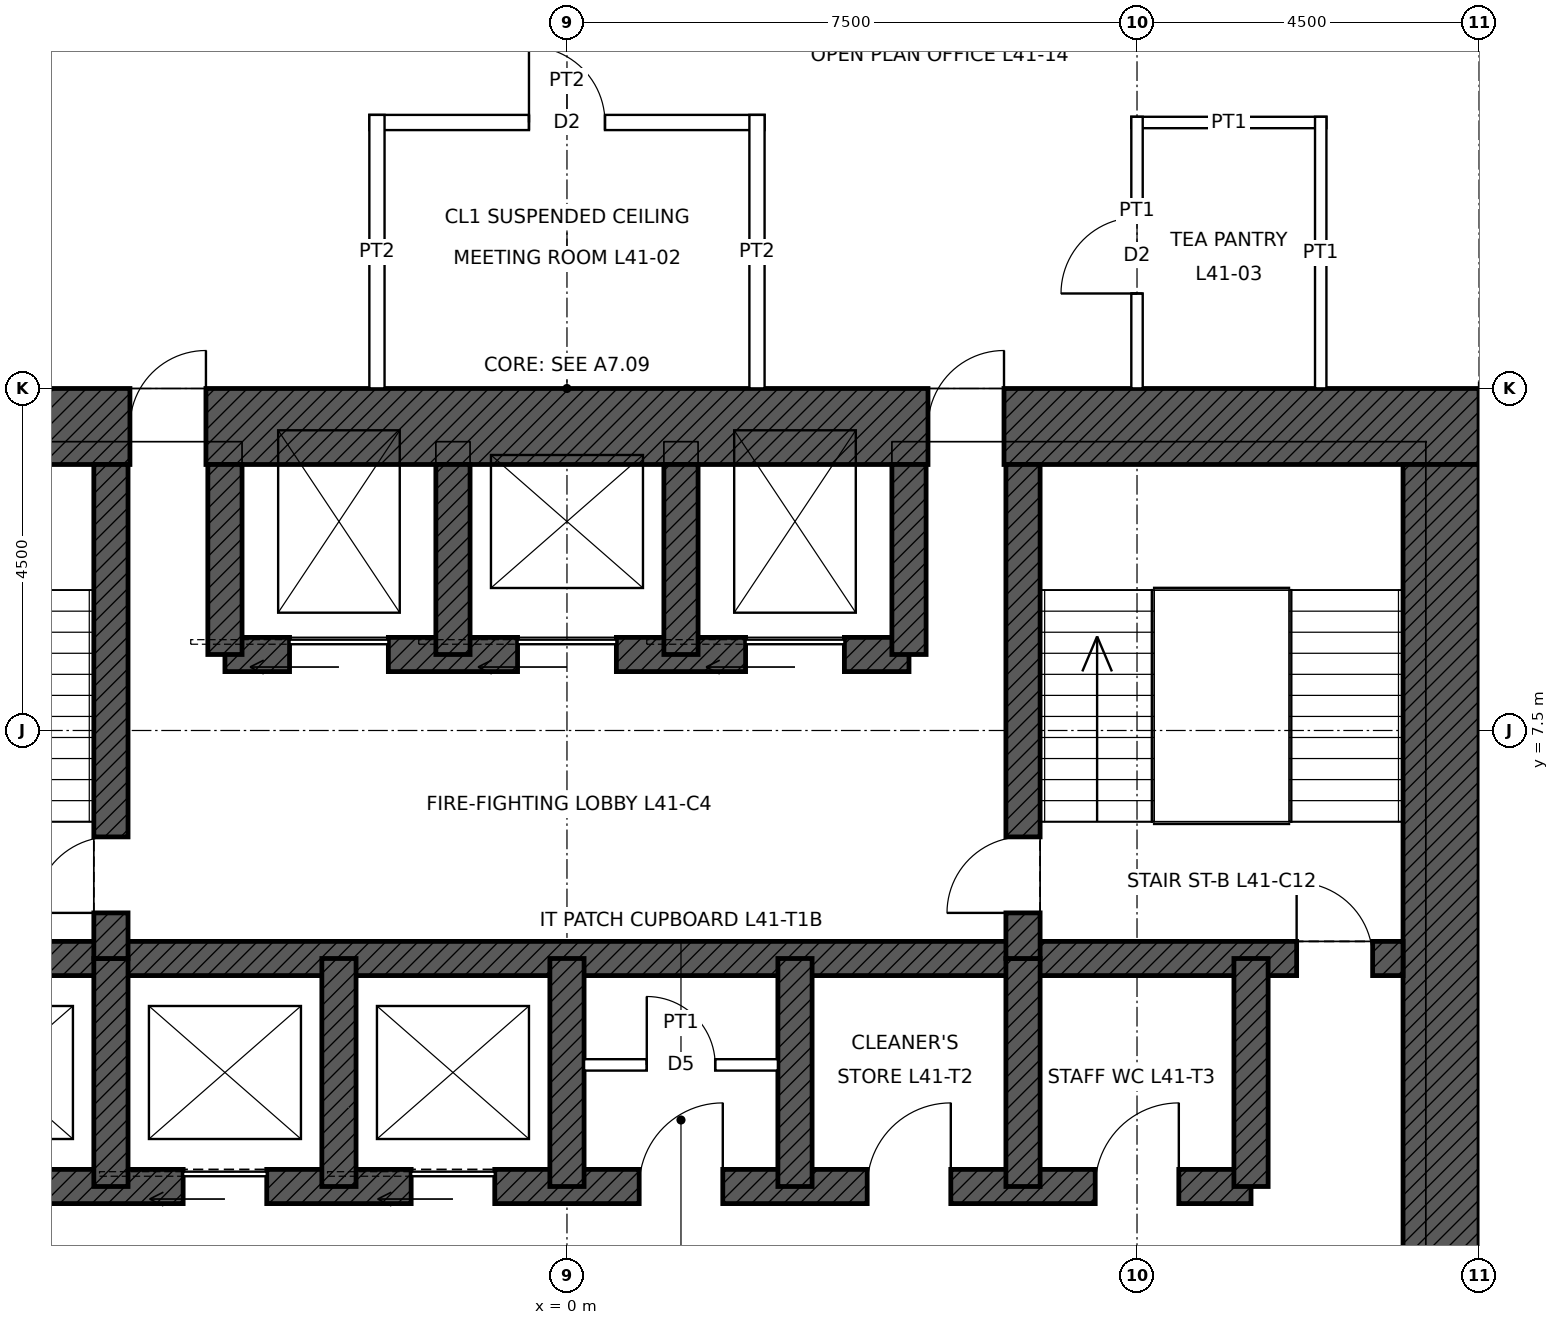
"""IFC4 building model, lengths in metres.
Left out: names, types, materials, properties, quantities, classifications, styles, units other than length and angle.
Written with IfcOpenShell. Run it as: python <this file> out.ifc"""

import sys

from ifc_helpers import new_model, si_unit, direction, frame, frame_2d, origin, place, context, subcontext, project, spatial, rectangle, extrude, element, fill, save


model = new_model("IFC4")
c1 = context("Model", 3, precision=1e-05, world=origin(), true_north=direction((0.0, 1.0)))
c2 = subcontext(c1, "Body", "Model", "MODEL_VIEW")
j1 = project(units=[si_unit("LENGTHUNIT", "METRE"), si_unit("PLANEANGLEUNIT", "RADIAN")], contexts=[c1])
p1 = place(None, origin())
s1 = spatial("IfcSite", under=j1, at=p1, CompositionType="ELEMENT")
p2 = place(p1, origin())
s2 = spatial("IfcBuilding", under=s1, at=p2, CompositionType="ELEMENT")
p3 = place(p2, frame((0.0, 0.0, 197.9)))
s3 = spatial("IfcBuildingStorey", under=s2, at=p3, CompositionType="ELEMENT", Elevation=197.9)
p4 = place(p3, frame((-12.0, 11.5, 0.0), z_axis=(0.0, 0.0, 1.0), x_axis=(1.0, 0.0, 0.0)))
e1 = element("IfcWall", 1, at=p4, inside=s3, PredefinedType="SHEAR", context=c2, shape_type="SweptSolid", body=[
    extrude(rectangle(XDim=24.0, YDim=1.0, at=frame_2d((12.0, 0.0))), origin(), (0.0, 0.0, 1.0), 4.0),
])
p5 = place(p4, frame((6.25, 0.0, 0.0)))
e2 = element("IfcOpeningElement", 2, at=p5, cuts=e1, PredefinedType="OPENING", context=c2, shape_type="SweptSolid", body=[
    extrude(rectangle(XDim=1.0, YDim=2.4, at=frame_2d((0.5, 1.2))), frame((0.0, 0.51, 0.0), z_axis=(0.0, -1.0, 0.0), x_axis=(1.0, 0.0, 0.0)), (0.0, 0.0, 1.0), 1.02),
])
p6 = place(p4, frame((16.75, 0.0, 0.0)))
e3 = element("IfcOpeningElement", 3, at=p6, cuts=e1, PredefinedType="OPENING", context=c2, shape_type="SweptSolid", body=[
    extrude(rectangle(XDim=1.0, YDim=2.4, at=frame_2d((0.5, 1.2))), frame((0.0, 0.51, 0.0), z_axis=(0.0, -1.0, 0.0), x_axis=(1.0, 0.0, 0.0)), (0.0, 0.0, 1.0), 1.02),
])
p7 = place(p3, frame((11.5, 11.0, 0.0), z_axis=(0.0, 0.0, 1.0), x_axis=(0.0, -1.0, 0.0)))
e4 = element("IfcWall", 4, at=p7, inside=s3, PredefinedType="SHEAR", context=c2, shape_type="SweptSolid", body=[
    extrude(rectangle(XDim=22.0, YDim=1.0, at=frame_2d((11.0, 0.0))), origin(), (0.0, 0.0, 1.0), 4.0),
])
p8 = place(p7, frame((10.5, 0.0, 0.0)))
e5 = element("IfcOpeningElement", 5, at=p8, cuts=e4, PredefinedType="OPENING", context=c2, shape_type="SweptSolid", body=[
    extrude(rectangle(XDim=1.0, YDim=2.4, at=frame_2d((0.5, 1.2))), frame((0.0, 0.51, 0.0), z_axis=(0.0, -1.0, 0.0), x_axis=(1.0, 0.0, 0.0)), (0.0, 0.0, 1.0), 1.02),
])
p9 = place(p3, frame((-11.0, 4.5, 0.0), z_axis=(0.0, 0.0, 1.0), x_axis=(1.0, 0.0, 0.0)))
e6 = element("IfcWall", 6, at=p9, inside=s3, PredefinedType="SHEAR", context=c2, shape_type="SweptSolid", body=[
    extrude(rectangle(XDim=22.0, YDim=0.45, at=frame_2d((11.0, 0.0))), origin(), (0.0, 0.0, 1.0), 4.0),
])
p10 = place(p9, frame((0.4, 0.0, 0.0)))
e7 = element("IfcOpeningElement", 7, at=p10, cuts=e6, PredefinedType="OPENING", context=c2, shape_type="SweptSolid", body=[
    extrude(rectangle(XDim=1.0, YDim=2.1, at=frame_2d((0.5, 1.05))), frame((0.0, 0.235, 0.0), z_axis=(0.0, -1.0, 0.0), x_axis=(1.0, 0.0, 0.0)), (0.0, 0.0, 1.0), 0.47),
])
p11 = place(p9, frame((20.6, 0.0, 0.0)))
e8 = element("IfcOpeningElement", 8, at=p11, cuts=e6, PredefinedType="OPENING", context=c2, shape_type="SweptSolid", body=[
    extrude(rectangle(XDim=1.0, YDim=2.1, at=frame_2d((0.5, 1.05))), frame((0.0, 0.235, 0.0), z_axis=(0.0, -1.0, 0.0), x_axis=(1.0, 0.0, 0.0)), (0.0, 0.0, 1.0), 0.47),
])
p12 = place(p3, frame((-9.0, 1.5, 0.0), z_axis=(0.0, 0.0, 1.0), x_axis=(1.0, 0.0, 0.0)))
e9 = element("IfcWall", 9, at=p12, inside=s3, PredefinedType="SHEAR", context=c2, shape_type="SweptSolid", body=[
    extrude(rectangle(XDim=18.0, YDim=0.45, at=frame_2d((9.0, 0.0))), origin(), (0.0, 0.0, 1.0), 4.0),
])
p13 = place(p12, frame((0.95, 0.0, 0.0)))
e10 = element("IfcOpeningElement", 10, at=p13, cuts=e9, PredefinedType="OPENING", context=c2, shape_type="SweptSolid", body=[
    extrude(rectangle(XDim=1.1, YDim=2.1, at=frame_2d((0.55, 1.05))), frame((0.0, 0.235, 0.0), z_axis=(0.0, -1.0, 0.0), x_axis=(1.0, 0.0, 0.0)), (0.0, 0.0, 1.0), 0.47),
])
p14 = place(p12, frame((3.95, 0.0, 0.0)))
e11 = element("IfcOpeningElement", 11, at=p14, cuts=e9, PredefinedType="OPENING", context=c2, shape_type="SweptSolid", body=[
    extrude(rectangle(XDim=1.1, YDim=2.1, at=frame_2d((0.55, 1.05))), frame((0.0, 0.235, 0.0), z_axis=(0.0, -1.0, 0.0), x_axis=(1.0, 0.0, 0.0)), (0.0, 0.0, 1.0), 0.47),
])
p15 = place(p12, frame((6.95, 0.0, 0.0)))
e12 = element("IfcOpeningElement", 12, at=p15, cuts=e9, PredefinedType="OPENING", context=c2, shape_type="SweptSolid", body=[
    extrude(rectangle(XDim=1.1, YDim=2.1, at=frame_2d((0.55, 1.05))), frame((0.0, 0.235, 0.0), z_axis=(0.0, -1.0, 0.0), x_axis=(1.0, 0.0, 0.0)), (0.0, 0.0, 1.0), 0.47),
])
p16 = place(p12, frame((9.95, 0.0, 0.0)))
e13 = element("IfcOpeningElement", 13, at=p16, cuts=e9, PredefinedType="OPENING", context=c2, shape_type="SweptSolid", body=[
    extrude(rectangle(XDim=1.1, YDim=2.1, at=frame_2d((0.55, 1.05))), frame((0.0, 0.235, 0.0), z_axis=(0.0, -1.0, 0.0), x_axis=(1.0, 0.0, 0.0)), (0.0, 0.0, 1.0), 0.47),
])
p17 = place(p12, frame((12.95, 0.0, 0.0)))
e14 = element("IfcOpeningElement", 14, at=p17, cuts=e9, PredefinedType="OPENING", context=c2, shape_type="SweptSolid", body=[
    extrude(rectangle(XDim=1.1, YDim=2.1, at=frame_2d((0.55, 1.05))), frame((0.0, 0.235, 0.0), z_axis=(0.0, -1.0, 0.0), x_axis=(1.0, 0.0, 0.0)), (0.0, 0.0, 1.0), 0.47),
])
p18 = place(p12, frame((15.95, 0.0, 0.0)))
e15 = element("IfcOpeningElement", 15, at=p18, cuts=e9, PredefinedType="OPENING", context=c2, shape_type="SweptSolid", body=[
    extrude(rectangle(XDim=1.1, YDim=2.1, at=frame_2d((0.55, 1.05))), frame((0.0, 0.235, 0.0), z_axis=(0.0, -1.0, 0.0), x_axis=(1.0, 0.0, 0.0)), (0.0, 0.0, 1.0), 0.47),
])
p19 = place(p3, frame((-4.5, 8.5, 0.0), z_axis=(0.0, 0.0, 1.0), x_axis=(1.0, 0.0, 0.0)))
e16 = element("IfcWall", 16, at=p19, inside=s3, PredefinedType="SHEAR", context=c2, shape_type="SweptSolid", body=[
    extrude(rectangle(XDim=9.0, YDim=0.45, at=frame_2d((4.5, 0.0))), origin(), (0.0, 0.0, 1.0), 4.0),
])
p20 = place(p19, frame((0.85, 0.0, 0.0)))
e17 = element("IfcOpeningElement", 17, at=p20, cuts=e16, PredefinedType="OPENING", context=c2, shape_type="SweptSolid", body=[
    extrude(rectangle(XDim=1.3, YDim=2.4, at=frame_2d((0.65, 1.2))), frame((0.0, 0.235, 0.0), z_axis=(0.0, -1.0, 0.0), x_axis=(1.0, 0.0, 0.0)), (0.0, 0.0, 1.0), 0.47),
])
p21 = place(p19, frame((6.85, 0.0, 0.0)))
e18 = element("IfcOpeningElement", 18, at=p21, cuts=e16, PredefinedType="OPENING", context=c2, shape_type="SweptSolid", body=[
    extrude(rectangle(XDim=1.3, YDim=2.4, at=frame_2d((0.65, 1.2))), frame((0.0, 0.235, 0.0), z_axis=(0.0, -1.0, 0.0), x_axis=(1.0, 0.0, 0.0)), (0.0, 0.0, 1.0), 0.47),
])
p22 = place(p19, frame((3.85, 0.0, 0.0)))
e19 = element("IfcOpeningElement", 19, at=p22, cuts=e16, PredefinedType="OPENING", context=c2, shape_type="SweptSolid", body=[
    extrude(rectangle(XDim=1.3, YDim=2.4, at=frame_2d((0.65, 1.2))), frame((0.0, 0.235, 0.0), z_axis=(0.0, -1.0, 0.0), x_axis=(1.0, 0.0, 0.0)), (0.0, 0.0, 1.0), 0.47),
])
for number, where, z_axis, x_axis in (
    (20, (9.0, 1.5, 0.0), (0.0, 0.0, 1.0), (0.0, 1.0, 0.0)),
    (21, (-6.0, 1.5, 0.0), (0.0, 0.0, 1.0), (0.0, 1.0, 0.0)),
    (22, (-3.0, 1.5, 0.0), (0.0, 0.0, 1.0), (0.0, 1.0, 0.0)),
    (23, (0.0, 1.5, 0.0), (0.0, 0.0, 1.0), (0.0, 1.0, 0.0)),
    (24, (3.0, 1.5, 0.0), (0.0, 0.0, 1.0), (0.0, 1.0, 0.0)),
    (25, (6.0, 1.5, 0.0), (0.0, 0.0, 1.0), (0.0, 1.0, 0.0)),
):
    element("IfcWall", number, at=place(p3, frame(where, z_axis=z_axis, x_axis=x_axis)), inside=s3, PredefinedType="SHEAR", context=c2, shape_type="SweptSolid", body=[
        extrude(rectangle(XDim=3.0, YDim=0.45, at=frame_2d((1.5, 0.0))), origin(), (0.0, 0.0, 1.0), 4.0),
    ])
p23 = place(p3, frame((-6.0, 4.5, 0.0), z_axis=(0.0, 0.0, 1.0), x_axis=(0.0, 1.0, 0.0)))
e26 = element("IfcWall", 26, at=p23, inside=s3, PredefinedType="SHEAR", context=c2, shape_type="SweptSolid", body=[
    extrude(rectangle(XDim=6.5, YDim=0.45, at=frame_2d((3.25, 0.0))), origin(), (0.0, 0.0, 1.0), 4.0),
])
p24 = place(p23, frame((0.6, 0.0, 0.0)))
e27 = element("IfcOpeningElement", 27, at=p24, cuts=e26, PredefinedType="OPENING", context=c2, shape_type="SweptSolid", body=[
    extrude(rectangle(XDim=1.0, YDim=2.1, at=frame_2d((0.5, 1.05))), frame((0.0, 0.235, 0.0), z_axis=(0.0, -1.0, 0.0), x_axis=(1.0, 0.0, 0.0)), (0.0, 0.0, 1.0), 0.47),
])
p25 = place(p3, frame((6.0, 4.5, 0.0), z_axis=(0.0, 0.0, 1.0), x_axis=(0.0, 1.0, 0.0)))
e28 = element("IfcWall", 28, at=p25, inside=s3, PredefinedType="SHEAR", context=c2, shape_type="SweptSolid", body=[
    extrude(rectangle(XDim=6.5, YDim=0.45, at=frame_2d((3.25, 0.0))), origin(), (0.0, 0.0, 1.0), 4.0),
])
p26 = place(p25, frame((0.6, 0.0, 0.0)))
e29 = element("IfcOpeningElement", 29, at=p26, cuts=e28, PredefinedType="OPENING", context=c2, shape_type="SweptSolid", body=[
    extrude(rectangle(XDim=1.0, YDim=2.1, at=frame_2d((0.5, 1.05))), frame((0.0, 0.235, 0.0), z_axis=(0.0, -1.0, 0.0), x_axis=(1.0, 0.0, 0.0)), (0.0, 0.0, 1.0), 0.47),
])
for number, where, z_axis, x_axis in (
    (30, (-4.5, 8.5, 0.0), (0.0, 0.0, 1.0), (0.0, 1.0, 0.0)),
    (31, (4.5, 8.5, 0.0), (0.0, 0.0, 1.0), (0.0, 1.0, 0.0)),
    (32, (-1.5, 8.5, 0.0), (0.0, 0.0, 1.0), (0.0, 1.0, 0.0)),
    (33, (1.5, 8.5, 0.0), (0.0, 0.0, 1.0), (0.0, 1.0, 0.0)),
):
    element("IfcWall", number, at=place(p3, frame(where, z_axis=z_axis, x_axis=x_axis)), inside=s3, PredefinedType="SHEAR", context=c2, shape_type="SweptSolid", body=[
        extrude(rectangle(XDim=2.5, YDim=0.45, at=frame_2d((1.25, 0.0))), origin(), (0.0, 0.0, 1.0), 4.0),
    ])
p27 = place(p3, frame((-2.6, 15.5, 0.0), z_axis=(0.0, 0.0, 1.0), x_axis=(1.0, 0.0, 0.0)))
e34 = element("IfcWall", 34, at=p27, inside=s3, PredefinedType="PARTITIONING", context=c2, shape_type="SweptSolid", body=[
    extrude(rectangle(XDim=5.2, YDim=0.2, at=frame_2d((2.6, 0.0))), origin(), (0.0, 0.0, 1.0), 3.85),
])
p28 = place(p27, frame((2.1, 0.0, 0.0)))
e35 = element("IfcOpeningElement", 35, at=p28, cuts=e34, PredefinedType="OPENING", context=c2, shape_type="SweptSolid", body=[
    extrude(rectangle(XDim=1.0, YDim=2.1, at=frame_2d((0.5, 1.05))), frame((0.0, 0.11, 0.0), z_axis=(0.0, -1.0, 0.0), x_axis=(1.0, 0.0, 0.0)), (0.0, 0.0, 1.0), 0.22),
])
p29 = place(p3, frame((7.425, 15.5, 0.0), z_axis=(0.0, 0.0, 1.0), x_axis=(1.0, 0.0, 0.0)))
e36 = element("IfcWall", 36, at=p29, inside=s3, PredefinedType="PARTITIONING", context=c2, shape_type="SweptSolid", body=[
    extrude(rectangle(XDim=2.567, YDim=0.15, at=frame_2d((1.283, 0.0))), origin(), (0.0, 0.0, 1.0), 3.85),
])
for number, where, z_axis, x_axis in (
    (37, (-2.5, 12.0, 0.0), (0.0, 0.0, 1.0), (0.0, 1.0, 0.0)),
    (38, (2.5, 12.0, 0.0), (0.0, 0.0, 1.0), (0.0, 1.0, 0.0)),
):
    element("IfcWall", number, at=place(p3, frame(where, z_axis=z_axis, x_axis=x_axis)), inside=s3, PredefinedType="PARTITIONING", context=c2, shape_type="SweptSolid", body=[
        extrude(rectangle(XDim=3.6, YDim=0.2, at=frame_2d((1.8, 0.0))), origin(), (0.0, 0.0, 1.0), 3.85),
    ])
p30 = place(p3, frame((7.5, 12.0, 0.0), z_axis=(0.0, 0.0, 1.0), x_axis=(0.0, 1.0, 0.0)))
e39 = element("IfcWall", 39, at=p30, inside=s3, PredefinedType="PARTITIONING", context=c2, shape_type="SweptSolid", body=[
    extrude(rectangle(XDim=3.575, YDim=0.15, at=frame_2d((1.788, 0.0))), origin(), (0.0, 0.0, 1.0), 3.238),
])
p31 = place(p30, frame((1.25, 0.0, 0.0)))
e40 = element("IfcOpeningElement", 40, at=p31, cuts=e39, PredefinedType="OPENING", context=c2, shape_type="SweptSolid", body=[
    extrude(rectangle(XDim=1.0, YDim=2.1, at=frame_2d((0.5, 1.05))), frame((0.0, 0.085, 0.0), z_axis=(0.0, -1.0, 0.0), x_axis=(1.0, 0.0, 0.0)), (0.0, 0.0, 1.0), 0.17),
])
p32 = place(p3, frame((9.917, 12.0, 0.0), z_axis=(0.0, 0.0, 1.0), x_axis=(0.0, 1.0, 0.0)))
e41 = element("IfcWall", 41, at=p32, inside=s3, PredefinedType="PARTITIONING", context=c2, shape_type="SweptSolid", body=[
    extrude(rectangle(XDim=3.575, YDim=0.15, at=frame_2d((1.788, 0.0))), origin(), (0.0, 0.0, 1.0), 3.85),
])
p33 = place(p3, frame((0.225, 3.1, 0.0), z_axis=(0.0, 0.0, 1.0), x_axis=(1.0, 0.0, 0.0)))
e42 = element("IfcWall", 42, at=p33, inside=s3, PredefinedType="PARTITIONING", context=c2, shape_type="SweptSolid", body=[
    extrude(rectangle(XDim=2.55, YDim=0.15, at=frame_2d((1.275, 0.0))), origin(), (0.0, 0.0, 1.0), 3.75),
])
p34 = place(p33, frame((0.825, 0.0, 0.0)))
e43 = element("IfcOpeningElement", 43, at=p34, cuts=e42, PredefinedType="OPENING", context=c2, shape_type="SweptSolid", body=[
    extrude(rectangle(XDim=0.9, YDim=2.1, at=frame_2d((0.45, 1.05))), frame((0.0, 0.085, 0.0), z_axis=(0.0, -1.0, 0.0), x_axis=(1.0, 0.0, 0.0)), (0.0, 0.0, 1.0), 0.17),
])
p35 = place(p11, origin())
e44 = element("IfcDoor", 44, at=p35, inside=s3, OperationType="SINGLE_SWING_LEFT", PredefinedType="DOOR", context=c2, shape_type="SweptSolid", body=[
    extrude(rectangle(XDim=1.0, YDim=2.1, at=frame_2d((0.5, 1.05))), frame((0.0, 0.025, 0.0), z_axis=(0.0, -1.0, 0.0), x_axis=(1.0, 0.0, 0.0)), (0.0, 0.0, 1.0), 0.05),
])
fill(e8, e44)
p36 = place(p24, origin())
e45 = element("IfcDoor", 45, at=p36, inside=s3, OperationType="SINGLE_SWING_LEFT", PredefinedType="DOOR", context=c2, shape_type="SweptSolid", body=[
    extrude(rectangle(XDim=1.0, YDim=2.1, at=frame_2d((0.5, 1.05))), frame((0.0, 0.025, 0.0), z_axis=(0.0, -1.0, 0.0), x_axis=(1.0, 0.0, 0.0)), (0.0, 0.0, 1.0), 0.05),
])
fill(e27, e45)
p37 = place(p26, origin())
e46 = element("IfcDoor", 46, at=p37, inside=s3, OperationType="SINGLE_SWING_LEFT", PredefinedType="DOOR", context=c2, shape_type="SweptSolid", body=[
    extrude(rectangle(XDim=1.0, YDim=2.1, at=frame_2d((0.5, 1.05))), frame((0.0, 0.025, 0.0), z_axis=(0.0, -1.0, 0.0), x_axis=(1.0, 0.0, 0.0)), (0.0, 0.0, 1.0), 0.05),
])
fill(e29, e46)
p38 = place(p5, origin())
e47 = element("IfcDoor", 47, at=p38, inside=s3, OperationType="SINGLE_SWING_RIGHT", PredefinedType="DOOR", context=c2, shape_type="SweptSolid", body=[
    extrude(rectangle(XDim=1.0, YDim=2.4, at=frame_2d((0.5, 1.2))), frame((0.0, 0.485, 0.0), z_axis=(0.0, -1.0, 0.0), x_axis=(1.0, 0.0, 0.0)), (0.0, 0.0, 1.0), 0.05),
])
fill(e2, e47)
p39 = place(p6, origin())
e48 = element("IfcDoor", 48, at=p39, inside=s3, OperationType="SINGLE_SWING_RIGHT", PredefinedType="DOOR", context=c2, shape_type="SweptSolid", body=[
    extrude(rectangle(XDim=1.0, YDim=2.4, at=frame_2d((0.5, 1.2))), frame((0.0, 0.485, 0.0), z_axis=(0.0, -1.0, 0.0), x_axis=(1.0, 0.0, 0.0)), (0.0, 0.0, 1.0), 0.05),
])
fill(e3, e48)
p40 = place(p20, origin())
e49 = element("IfcDoor", 49, at=p40, inside=s3, OperationType="SLIDING_TO_LEFT", PredefinedType="DOOR", context=c2, shape_type="SweptSolid", body=[
    extrude(rectangle(XDim=1.3, YDim=2.4, at=frame_2d((0.65, 1.2))), frame((0.0, 0.025, 0.0), z_axis=(0.0, -1.0, 0.0), x_axis=(1.0, 0.0, 0.0)), (0.0, 0.0, 1.0), 0.05),
])
fill(e17, e49)
p41 = place(p21, origin())
e50 = element("IfcDoor", 50, at=p41, inside=s3, OperationType="SLIDING_TO_LEFT", PredefinedType="DOOR", context=c2, shape_type="SweptSolid", body=[
    extrude(rectangle(XDim=1.3, YDim=2.4, at=frame_2d((0.65, 1.2))), frame((0.0, 0.025, 0.0), z_axis=(0.0, -1.0, 0.0), x_axis=(1.0, 0.0, 0.0)), (0.0, 0.0, 1.0), 0.05),
])
fill(e18, e50)
p42 = place(p22, origin())
e51 = element("IfcDoor", 51, at=p42, inside=s3, OperationType="SLIDING_TO_LEFT", PredefinedType="DOOR", context=c2, shape_type="SweptSolid", body=[
    extrude(rectangle(XDim=1.3, YDim=2.4, at=frame_2d((0.65, 1.2))), frame((0.0, 0.025, 0.0), z_axis=(0.0, -1.0, 0.0), x_axis=(1.0, 0.0, 0.0)), (0.0, 0.0, 1.0), 0.05),
])
fill(e19, e51)
p43 = place(p14, origin())
e52 = element("IfcDoor", 52, at=p43, inside=s3, OperationType="SLIDING_TO_LEFT", PredefinedType="DOOR", context=c2, shape_type="SweptSolid", body=[
    extrude(rectangle(XDim=1.1, YDim=2.1, at=frame_2d((0.55, 1.05))), frame((0.0, 0.025, 0.0), z_axis=(0.0, -1.0, 0.0), x_axis=(1.0, 0.0, 0.0)), (0.0, 0.0, 1.0), 0.05),
])
fill(e11, e52)
p44 = place(p15, origin())
e53 = element("IfcDoor", 53, at=p44, inside=s3, OperationType="SLIDING_TO_LEFT", PredefinedType="DOOR", context=c2, shape_type="SweptSolid", body=[
    extrude(rectangle(XDim=1.1, YDim=2.1, at=frame_2d((0.55, 1.05))), frame((0.0, 0.025, 0.0), z_axis=(0.0, -1.0, 0.0), x_axis=(1.0, 0.0, 0.0)), (0.0, 0.0, 1.0), 0.05),
])
fill(e12, e53)
p45 = place(p16, origin())
e54 = element("IfcDoor", 54, at=p45, inside=s3, OperationType="SINGLE_SWING_RIGHT", PredefinedType="DOOR", context=c2, shape_type="SweptSolid", body=[
    extrude(rectangle(XDim=1.1, YDim=2.1, at=frame_2d((0.55, 1.05))), frame((0.0, 0.025, 0.0), z_axis=(0.0, -1.0, 0.0), x_axis=(1.0, 0.0, 0.0)), (0.0, 0.0, 1.0), 0.05),
])
fill(e13, e54)
p46 = place(p34, origin())
e55 = element("IfcDoor", 55, at=p46, inside=s3, OperationType="SINGLE_SWING_LEFT", PredefinedType="DOOR", context=c2, shape_type="SweptSolid", body=[
    extrude(rectangle(XDim=0.9, YDim=2.1, at=frame_2d((0.45, 1.05))), frame((0.0, 0.025, 0.0), z_axis=(0.0, -1.0, 0.0), x_axis=(1.0, 0.0, 0.0)), (0.0, 0.0, 1.0), 0.05),
])
fill(e43, e55)
p47 = place(p17, origin())
e56 = element("IfcDoor", 56, at=p47, inside=s3, OperationType="SINGLE_SWING_RIGHT", PredefinedType="DOOR", context=c2, shape_type="SweptSolid", body=[
    extrude(rectangle(XDim=1.1, YDim=2.1, at=frame_2d((0.55, 1.05))), frame((0.0, 0.025, 0.0), z_axis=(0.0, -1.0, 0.0), x_axis=(1.0, 0.0, 0.0)), (0.0, 0.0, 1.0), 0.05),
])
fill(e14, e56)
p48 = place(p18, origin())
e57 = element("IfcDoor", 57, at=p48, inside=s3, OperationType="SINGLE_SWING_RIGHT", PredefinedType="DOOR", context=c2, shape_type="SweptSolid", body=[
    extrude(rectangle(XDim=1.1, YDim=2.1, at=frame_2d((0.55, 1.05))), frame((0.0, 0.025, 0.0), z_axis=(0.0, -1.0, 0.0), x_axis=(1.0, 0.0, 0.0)), (0.0, 0.0, 1.0), 0.05),
])
fill(e15, e57)
p49 = place(p28, origin())
e58 = element("IfcDoor", 58, at=p49, inside=s3, OperationType="SINGLE_SWING_LEFT", PredefinedType="DOOR", context=c2, shape_type="SweptSolid", body=[
    extrude(rectangle(XDim=1.0, YDim=2.1, at=frame_2d((0.5, 1.05))), frame((0.0, 0.025, 0.0), z_axis=(0.0, -1.0, 0.0), x_axis=(1.0, 0.0, 0.0)), (0.0, 0.0, 1.0), 0.05),
])
fill(e35, e58)
p50 = place(p31, origin())
e59 = element("IfcDoor", 59, at=p50, inside=s3, OperationType="SINGLE_SWING_LEFT", PredefinedType="DOOR", context=c2, shape_type="SweptSolid", body=[
    extrude(rectangle(XDim=1.0, YDim=2.1, at=frame_2d((0.5, 1.05))), frame((0.0, 0.025, 0.0), z_axis=(0.0, -1.0, 0.0), x_axis=(1.0, 0.0, 0.0)), (0.0, 0.0, 1.0), 0.05),
])
fill(e40, e59)
save(model, sys.argv[1])
